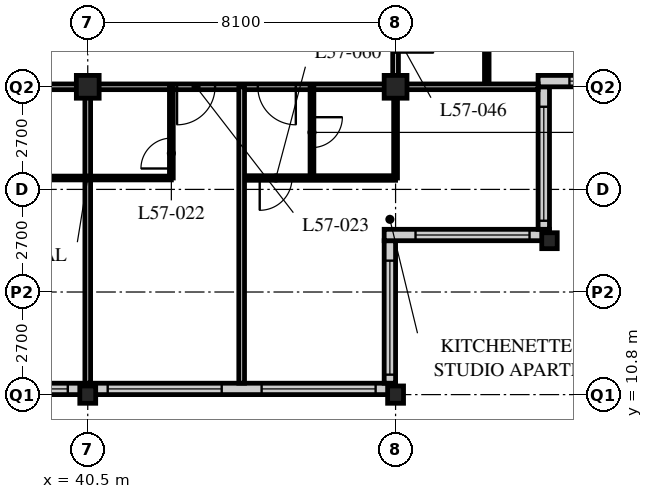
"""IFC4 building model, lengths in metres.
Left out: names, types, materials, properties, quantities, classifications, styles, units other than length and angle.
Written with IfcOpenShell. Run it as: python <this file> out.ifc"""

import sys

from ifc_helpers import new_model, si_unit, direction, frame, frame_2d, origin, origin_2d, place, context, subcontext, project, spatial, rectangle, hollow_rectangle, i_section, extrude, element, fill, save


model = new_model("IFC4")
c1 = context("Model", 3, precision=1e-05, world=origin(), true_north=direction((0.0, 1.0)))
c2 = subcontext(c1, "Body", "Model", "MODEL_VIEW")
j1 = project(units=[si_unit("LENGTHUNIT", "METRE"), si_unit("PLANEANGLEUNIT", "RADIAN")], contexts=[c1])
p1 = place(None, origin())
s1 = spatial("IfcSite", under=j1, at=p1, CompositionType="ELEMENT")
p2 = place(p1, origin())
s2 = spatial("IfcBuilding", under=s1, at=p2, CompositionType="ELEMENT")
p3 = place(p2, frame((0.0, 0.0, 220.8)))
s3 = spatial("IfcBuildingStorey", under=s2, at=p3, CompositionType="ELEMENT", Elevation=220.8)
p4 = place(p3, frame((40.5, 10.8, 0.0), z_axis=(0.0, 0.0, 1.0), x_axis=(1.0, 0.0, 0.0)))
e1 = element("IfcColumn", 1, at=p4, inside=s3, PredefinedType="COLUMN", context=c2, shape_type="SweptSolid", body=[
    extrude(i_section(OverallWidth=0.418, OverallDepth=0.456, WebThickness=0.042, FlangeThickness=0.067, FilletRadius=0.015, at=origin_2d()), origin(), (0.0, 0.0, 1.0), 3.6),
])
p5 = place(p3, frame((40.5, 18.9, 0.0), z_axis=(0.0, 0.0, 1.0), x_axis=(1.0, 0.0, 0.0)))
e2 = element("IfcColumn", 2, at=p5, inside=s3, PredefinedType="COLUMN", context=c2, shape_type="SweptSolid", body=[
    extrude(hollow_rectangle(XDim=0.6, YDim=0.6, WallThickness=0.05, at=origin_2d()), origin(), (0.0, 0.0, 1.0), 3.6),
])
p6 = place(p3, frame((48.6, 10.8, 0.0), z_axis=(0.0, 0.0, 1.0), x_axis=(1.0, 0.0, 0.0)))
e3 = element("IfcColumn", 3, at=p6, inside=s3, PredefinedType="COLUMN", context=c2, shape_type="SweptSolid", body=[
    extrude(i_section(OverallWidth=0.418, OverallDepth=0.456, WebThickness=0.042, FlangeThickness=0.067, FilletRadius=0.015, at=origin_2d()), origin(), (0.0, 0.0, 1.0), 3.6),
])
p7 = place(p3, frame((48.6, 18.9, 0.0), z_axis=(0.0, 0.0, 1.0), x_axis=(1.0, 0.0, 0.0)))
e4 = element("IfcColumn", 4, at=p7, inside=s3, PredefinedType="COLUMN", context=c2, shape_type="SweptSolid", body=[
    extrude(hollow_rectangle(XDim=0.6, YDim=0.6, WallThickness=0.05, at=origin_2d()), origin(), (0.0, 0.0, 1.0), 3.6),
])
p8 = place(p3, frame((52.65, 14.85, 0.0), z_axis=(0.0, 0.0, 1.0), x_axis=(1.0, 0.0, 0.0)))
e5 = element("IfcColumn", 5, at=p8, inside=s3, PredefinedType="COLUMN", context=c2, shape_type="SweptSolid", body=[
    extrude(i_section(OverallWidth=0.407, OverallDepth=0.419, WebThickness=0.031, FlangeThickness=0.049, FilletRadius=0.015, at=origin_2d()), origin(), (0.0, 0.0, 1.0), 3.6),
])
p9 = place(p3, frame((8.4, 10.95, 0.0), z_axis=(0.0, 0.0, 1.0), x_axis=(1.0, 0.0, 0.0)))
e6 = element("IfcWall", 6, at=p9, inside=s3, PredefinedType="SOLIDWALL", context=c2, shape_type="SweptSolid", body=[
    extrude(rectangle(XDim=40.2, YDim=0.3, at=frame_2d((20.1, 0.0))), origin(), (0.0, 0.0, 1.0), 3.39),
])
p10 = place(p9, frame((0.225, 0.0, 0.6)))
e7 = element("IfcOpeningElement", 7, at=p10, cuts=e6, PredefinedType="OPENING", context=c2, shape_type="SweptSolid", body=[
    extrude(rectangle(XDim=3.0, YDim=2.0, at=frame_2d((1.5, 1.0))), frame((0.0, 0.16, 0.0), z_axis=(0.0, -1.0, 0.0), x_axis=(1.0, 0.0, 0.0)), (0.0, 0.0, 1.0), 0.32),
])
p11 = place(p9, frame((4.275, 0.0, 0.6)))
e8 = element("IfcOpeningElement", 8, at=p11, cuts=e6, PredefinedType="OPENING", context=c2, shape_type="SweptSolid", body=[
    extrude(rectangle(XDim=3.0, YDim=2.0, at=frame_2d((1.5, 1.0))), frame((0.0, 0.16, 0.0), z_axis=(0.0, -1.0, 0.0), x_axis=(1.0, 0.0, 0.0)), (0.0, 0.0, 1.0), 0.32),
])
p12 = place(p9, frame((8.325, 0.0, 0.6)))
e9 = element("IfcOpeningElement", 9, at=p12, cuts=e6, PredefinedType="OPENING", context=c2, shape_type="SweptSolid", body=[
    extrude(rectangle(XDim=3.0, YDim=2.0, at=frame_2d((1.5, 1.0))), frame((0.0, 0.16, 0.0), z_axis=(0.0, -1.0, 0.0), x_axis=(1.0, 0.0, 0.0)), (0.0, 0.0, 1.0), 0.32),
])
p13 = place(p9, frame((12.375, 0.0, 0.6)))
e10 = element("IfcOpeningElement", 10, at=p13, cuts=e6, PredefinedType="OPENING", context=c2, shape_type="SweptSolid", body=[
    extrude(rectangle(XDim=3.0, YDim=2.0, at=frame_2d((1.5, 1.0))), frame((0.0, 0.16, 0.0), z_axis=(0.0, -1.0, 0.0), x_axis=(1.0, 0.0, 0.0)), (0.0, 0.0, 1.0), 0.32),
])
p14 = place(p9, frame((16.425, 0.0, 0.6)))
e11 = element("IfcOpeningElement", 11, at=p14, cuts=e6, PredefinedType="OPENING", context=c2, shape_type="SweptSolid", body=[
    extrude(rectangle(XDim=3.0, YDim=2.0, at=frame_2d((1.5, 1.0))), frame((0.0, 0.16, 0.0), z_axis=(0.0, -1.0, 0.0), x_axis=(1.0, 0.0, 0.0)), (0.0, 0.0, 1.0), 0.32),
])
p15 = place(p9, frame((20.475, 0.0, 0.6)))
e12 = element("IfcOpeningElement", 12, at=p15, cuts=e6, PredefinedType="OPENING", context=c2, shape_type="SweptSolid", body=[
    extrude(rectangle(XDim=3.0, YDim=2.0, at=frame_2d((1.5, 1.0))), frame((0.0, 0.16, 0.0), z_axis=(0.0, -1.0, 0.0), x_axis=(1.0, 0.0, 0.0)), (0.0, 0.0, 1.0), 0.32),
])
p16 = place(p9, frame((24.525, 0.0, 0.6)))
e13 = element("IfcOpeningElement", 13, at=p16, cuts=e6, PredefinedType="OPENING", context=c2, shape_type="SweptSolid", body=[
    extrude(rectangle(XDim=3.0, YDim=2.0, at=frame_2d((1.5, 1.0))), frame((0.0, 0.16, 0.0), z_axis=(0.0, -1.0, 0.0), x_axis=(1.0, 0.0, 0.0)), (0.0, 0.0, 1.0), 0.32),
])
p17 = place(p9, frame((28.575, 0.0, 0.6)))
e14 = element("IfcOpeningElement", 14, at=p17, cuts=e6, PredefinedType="OPENING", context=c2, shape_type="SweptSolid", body=[
    extrude(rectangle(XDim=3.0, YDim=2.0, at=frame_2d((1.5, 1.0))), frame((0.0, 0.16, 0.0), z_axis=(0.0, -1.0, 0.0), x_axis=(1.0, 0.0, 0.0)), (0.0, 0.0, 1.0), 0.32),
])
p18 = place(p9, frame((32.625, 0.0, 0.6)))
e15 = element("IfcOpeningElement", 15, at=p18, cuts=e6, PredefinedType="OPENING", context=c2, shape_type="SweptSolid", body=[
    extrude(rectangle(XDim=3.0, YDim=2.0, at=frame_2d((1.5, 1.0))), frame((0.0, 0.16, 0.0), z_axis=(0.0, -1.0, 0.0), x_axis=(1.0, 0.0, 0.0)), (0.0, 0.0, 1.0), 0.32),
])
p19 = place(p9, frame((36.675, 0.0, 0.6)))
e16 = element("IfcOpeningElement", 16, at=p19, cuts=e6, PredefinedType="OPENING", context=c2, shape_type="SweptSolid", body=[
    extrude(rectangle(XDim=3.0, YDim=2.0, at=frame_2d((1.5, 1.0))), frame((0.0, 0.16, 0.0), z_axis=(0.0, -1.0, 0.0), x_axis=(1.0, 0.0, 0.0)), (0.0, 0.0, 1.0), 0.32),
])
p20 = place(p3, frame((48.45, 11.1, 0.0), z_axis=(0.0, 0.0, 1.0), x_axis=(0.0, 1.0, 0.0)))
e17 = element("IfcWall", 17, at=p20, inside=s3, PredefinedType="SOLIDWALL", context=c2, shape_type="SweptSolid", body=[
    extrude(rectangle(XDim=3.75, YDim=0.3, at=frame_2d((1.875, 0.0))), origin(), (0.0, 0.0, 1.0), 3.39),
])
p21 = place(p20, frame((0.225, 0.0, 0.6)))
e18 = element("IfcOpeningElement", 18, at=p21, cuts=e17, PredefinedType="OPENING", context=c2, shape_type="SweptSolid", body=[
    extrude(rectangle(XDim=3.0, YDim=2.0, at=frame_2d((1.5, 1.0))), frame((0.0, 0.16, 0.0), z_axis=(0.0, -1.0, 0.0), x_axis=(1.0, 0.0, 0.0)), (0.0, 0.0, 1.0), 0.32),
])
p22 = place(p3, frame((48.3, 15.0, 0.0), z_axis=(0.0, 0.0, 1.0), x_axis=(1.0, 0.0, 0.0)))
e19 = element("IfcWall", 19, at=p22, inside=s3, PredefinedType="SOLIDWALL", context=c2, shape_type="SweptSolid", body=[
    extrude(rectangle(XDim=4.35, YDim=0.3, at=frame_2d((2.175, 0.0))), origin(), (0.0, 0.0, 1.0), 3.39),
])
p23 = place(p22, frame((0.825, 0.0, 0.6)))
e20 = element("IfcOpeningElement", 20, at=p23, cuts=e19, PredefinedType="OPENING", context=c2, shape_type="SweptSolid", body=[
    extrude(rectangle(XDim=3.0, YDim=2.0, at=frame_2d((1.5, 1.0))), frame((0.0, 0.16, 0.0), z_axis=(0.0, -1.0, 0.0), x_axis=(1.0, 0.0, 0.0)), (0.0, 0.0, 1.0), 0.32),
])
p24 = place(p3, frame((52.5, 15.15, 0.0), z_axis=(0.0, 0.0, 1.0), x_axis=(0.0, 1.0, 0.0)))
e21 = element("IfcWall", 21, at=p24, inside=s3, PredefinedType="SOLIDWALL", context=c2, shape_type="SweptSolid", body=[
    extrude(rectangle(XDim=3.75, YDim=0.3, at=frame_2d((1.875, 0.0))), origin(), (0.0, 0.0, 1.0), 3.39),
])
p25 = place(p24, frame((0.225, 0.0, 0.6)))
e22 = element("IfcOpeningElement", 22, at=p25, cuts=e21, PredefinedType="OPENING", context=c2, shape_type="SweptSolid", body=[
    extrude(rectangle(XDim=3.0, YDim=2.0, at=frame_2d((1.5, 1.0))), frame((0.0, 0.16, 0.0), z_axis=(0.0, -1.0, 0.0), x_axis=(1.0, 0.0, 0.0)), (0.0, 0.0, 1.0), 0.32),
])
p26 = place(p3, frame((52.35, 19.05, 0.0), z_axis=(0.0, 0.0, 1.0), x_axis=(1.0, 0.0, 0.0)))
e23 = element("IfcWall", 23, at=p26, inside=s3, PredefinedType="SOLIDWALL", context=c2, shape_type="SweptSolid", body=[
    extrude(rectangle(XDim=4.35, YDim=0.3, at=frame_2d((2.175, 0.0))), origin(), (0.0, 0.0, 1.0), 3.39),
])
p27 = place(p26, frame((0.825, 0.0, 0.6)))
e24 = element("IfcOpeningElement", 24, at=p27, cuts=e23, PredefinedType="OPENING", context=c2, shape_type="SweptSolid", body=[
    extrude(rectangle(XDim=3.0, YDim=2.0, at=frame_2d((1.5, 1.0))), frame((0.0, 0.16, 0.0), z_axis=(0.0, -1.0, 0.0), x_axis=(1.0, 0.0, 0.0)), (0.0, 0.0, 1.0), 0.32),
])
p28 = place(p3, frame((12.15, 18.9, 0.0), z_axis=(0.0, 0.0, 1.0), x_axis=(1.0, 0.0, 0.0)))
e25 = element("IfcWall", 25, at=p28, inside=s3, PredefinedType="PARTITIONING", context=c2, shape_type="SweptSolid", body=[
    extrude(rectangle(XDim=36.45, YDim=0.15, at=frame_2d((18.225, 0.0))), origin(), (0.0, 0.0, 1.0), 2.628),
])
p29 = place(p28, frame((4.95, 0.0, 0.0)))
e26 = element("IfcOpeningElement", 26, at=p29, cuts=e25, PredefinedType="OPENING", context=c2, shape_type="SweptSolid", body=[
    extrude(rectangle(XDim=1.0, YDim=2.1, at=frame_2d((0.5, 1.05))), frame((0.0, 0.085, 0.0), z_axis=(0.0, -1.0, 0.0), x_axis=(1.0, 0.0, 0.0)), (0.0, 0.0, 1.0), 0.17),
])
p30 = place(p28, frame((22.6, 0.0, 0.0)))
e27 = element("IfcOpeningElement", 27, at=p30, cuts=e25, PredefinedType="OPENING", context=c2, shape_type="SweptSolid", body=[
    extrude(rectangle(XDim=1.0, YDim=2.1, at=frame_2d((0.5, 1.05))), frame((0.0, 0.085, 0.0), z_axis=(0.0, -1.0, 0.0), x_axis=(1.0, 0.0, 0.0)), (0.0, 0.0, 1.0), 0.17),
])
p31 = place(p28, frame((25.0, 0.0, 0.0)))
e28 = element("IfcOpeningElement", 28, at=p31, cuts=e25, PredefinedType="OPENING", context=c2, shape_type="SweptSolid", body=[
    extrude(rectangle(XDim=1.0, YDim=2.1, at=frame_2d((0.5, 1.05))), frame((0.0, 0.085, 0.0), z_axis=(0.0, -1.0, 0.0), x_axis=(1.0, 0.0, 0.0)), (0.0, 0.0, 1.0), 0.17),
])
p32 = place(p28, frame((30.7, 0.0, 0.0)))
e29 = element("IfcOpeningElement", 29, at=p32, cuts=e25, PredefinedType="OPENING", context=c2, shape_type="SweptSolid", body=[
    extrude(rectangle(XDim=1.0, YDim=2.1, at=frame_2d((0.5, 1.05))), frame((0.0, 0.085, 0.0), z_axis=(0.0, -1.0, 0.0), x_axis=(1.0, 0.0, 0.0)), (0.0, 0.0, 1.0), 0.17),
])
p33 = place(p28, frame((1.525, 0.0, 0.0)))
e30 = element("IfcOpeningElement", 30, at=p33, cuts=e25, PredefinedType="OPENING", context=c2, shape_type="SweptSolid", body=[
    extrude(rectangle(XDim=1.0, YDim=2.1, at=frame_2d((0.5, 1.05))), frame((0.0, 0.085, 0.0), z_axis=(0.0, -1.0, 0.0), x_axis=(1.0, 0.0, 0.0)), (0.0, 0.0, 1.0), 0.17),
])
p34 = place(p28, frame((32.825, 0.0, 0.0)))
e31 = element("IfcOpeningElement", 31, at=p34, cuts=e25, PredefinedType="OPENING", context=c2, shape_type="SweptSolid", body=[
    extrude(rectangle(XDim=1.0, YDim=2.1, at=frame_2d((0.5, 1.05))), frame((0.0, 0.085, 0.0), z_axis=(0.0, -1.0, 0.0), x_axis=(1.0, 0.0, 0.0)), (0.0, 0.0, 1.0), 0.17),
])
p35 = place(p3, frame((48.6, 18.9, 0.0), z_axis=(0.0, 0.0, 1.0), x_axis=(0.0, 1.0, 0.0)))
e32 = element("IfcWall", 32, at=p35, inside=s3, PredefinedType="PARTITIONING", context=c2, shape_type="SweptSolid", body=[
    extrude(rectangle(XDim=24.3, YDim=0.15, at=frame_2d((12.15, 0.0))), origin(), (0.0, 0.0, 1.0), 2.628),
])
p36 = place(p35, frame((0.9, 0.0, 0.0)))
e33 = element("IfcOpeningElement", 33, at=p36, cuts=e32, PredefinedType="OPENING", context=c2, shape_type="SweptSolid", body=[
    extrude(rectangle(XDim=1.0, YDim=2.1, at=frame_2d((0.5, 1.05))), frame((0.0, 0.085, 0.0), z_axis=(0.0, -1.0, 0.0), x_axis=(1.0, 0.0, 0.0)), (0.0, 0.0, 1.0), 0.17),
])
p37 = place(p35, frame((20.95, 0.0, 0.0)))
e34 = element("IfcOpeningElement", 34, at=p37, cuts=e32, PredefinedType="OPENING", context=c2, shape_type="SweptSolid", body=[
    extrude(rectangle(XDim=1.0, YDim=2.1, at=frame_2d((0.5, 1.05))), frame((0.0, 0.085, 0.0), z_axis=(0.0, -1.0, 0.0), x_axis=(1.0, 0.0, 0.0)), (0.0, 0.0, 1.0), 0.17),
])
p38 = place(p3, frame((38.3, 16.5, 0.0), z_axis=(0.0, 0.0, 1.0), x_axis=(1.0, 0.0, 0.0)))
e35 = element("IfcWall", 35, at=p38, inside=s3, PredefinedType="PARTITIONING", context=c2, shape_type="SweptSolid", body=[
    extrude(rectangle(XDim=4.4, YDim=0.1, at=frame_2d((2.2, 0.0))), origin(), (0.0, 0.0, 1.0), 3.39),
])
p39 = place(p3, frame((40.5, 18.9, 0.0), z_axis=(0.0, 0.0, 1.0), x_axis=(0.0, -1.0, 0.0)))
e36 = element("IfcWall", 36, at=p39, inside=s3, PredefinedType="PARTITIONING", context=c2, shape_type="SweptSolid", body=[
    extrude(rectangle(XDim=7.8, YDim=0.15, at=frame_2d((3.9, 0.0))), origin(), (0.0, 0.0, 1.0), 2.628),
])
p40 = place(p3, frame((42.7, 18.9, 0.0), z_axis=(0.0, 0.0, 1.0), x_axis=(0.0, -1.0, 0.0)))
e37 = element("IfcWall", 37, at=p40, inside=s3, PredefinedType="PARTITIONING", context=c2, shape_type="SweptSolid", body=[
    extrude(rectangle(XDim=2.4, YDim=0.1, at=frame_2d((1.2, 0.0))), origin(), (0.0, 0.0, 1.0), 3.39),
])
p41 = place(p40, frame((1.35, 0.0, 0.0)))
e38 = element("IfcOpeningElement", 38, at=p41, cuts=e37, PredefinedType="OPENING", context=c2, shape_type="SweptSolid", body=[
    extrude(rectangle(XDim=0.8, YDim=2.1, at=frame_2d((0.4, 1.05))), frame((0.0, 0.06, 0.0), z_axis=(0.0, -1.0, 0.0), x_axis=(1.0, 0.0, 0.0)), (0.0, 0.0, 1.0), 0.12),
])
p42 = place(p3, frame((51.0, 18.9, 0.0), z_axis=(0.0, 0.0, 1.0), x_axis=(0.0, 1.0, 0.0)))
e39 = element("IfcWall", 39, at=p42, inside=s3, PredefinedType="PARTITIONING", context=c2, shape_type="SweptSolid", body=[
    extrude(rectangle(XDim=20.25, YDim=0.12, at=frame_2d((10.125, 0.0))), origin(), (0.0, 0.0, 1.0), 3.39),
])
p43 = place(p42, frame((0.975, 0.0, 0.0)))
e40 = element("IfcOpeningElement", 40, at=p43, cuts=e39, PredefinedType="OPENING", context=c2, shape_type="SweptSolid", body=[
    extrude(rectangle(XDim=0.85, YDim=2.1, at=frame_2d((0.425, 1.05))), frame((0.0, 0.07, 0.0), z_axis=(0.0, -1.0, 0.0), x_axis=(1.0, 0.0, 0.0)), (0.0, 0.0, 1.0), 0.14),
])
p44 = place(p42, frame((8.425, 0.0, 0.0)))
e41 = element("IfcOpeningElement", 41, at=p44, cuts=e39, PredefinedType="OPENING", context=c2, shape_type="SweptSolid", body=[
    extrude(rectangle(XDim=0.85, YDim=2.1, at=frame_2d((0.425, 1.05))), frame((0.0, 0.07, 0.0), z_axis=(0.0, -1.0, 0.0), x_axis=(1.0, 0.0, 0.0)), (0.0, 0.0, 1.0), 0.14),
])
p45 = place(p42, frame((12.475, 0.0, 0.0)))
e42 = element("IfcOpeningElement", 42, at=p45, cuts=e39, PredefinedType="OPENING", context=c2, shape_type="SweptSolid", body=[
    extrude(rectangle(XDim=0.85, YDim=2.1, at=frame_2d((0.425, 1.05))), frame((0.0, 0.07, 0.0), z_axis=(0.0, -1.0, 0.0), x_axis=(1.0, 0.0, 0.0)), (0.0, 0.0, 1.0), 0.14),
])
p46 = place(p42, frame((16.525, 0.0, 0.0)))
e43 = element("IfcOpeningElement", 43, at=p46, cuts=e39, PredefinedType="OPENING", context=c2, shape_type="SweptSolid", body=[
    extrude(rectangle(XDim=0.85, YDim=2.1, at=frame_2d((0.425, 1.05))), frame((0.0, 0.07, 0.0), z_axis=(0.0, -1.0, 0.0), x_axis=(1.0, 0.0, 0.0)), (0.0, 0.0, 1.0), 0.14),
])
p47 = place(p3, frame((44.55, 16.5, 0.0), z_axis=(0.0, 0.0, 1.0), x_axis=(1.0, 0.0, 0.0)))
e44 = element("IfcWall", 44, at=p47, inside=s3, PredefinedType="PARTITIONING", context=c2, shape_type="SweptSolid", body=[
    extrude(rectangle(XDim=4.05, YDim=0.12, at=frame_2d((2.025, 0.0))), origin(), (0.0, 0.0, 1.0), 3.39),
])
p48 = place(p47, frame((0.475, 0.0, 0.0)))
e45 = element("IfcOpeningElement", 45, at=p48, cuts=e44, PredefinedType="OPENING", context=c2, shape_type="SweptSolid", body=[
    extrude(rectangle(XDim=0.85, YDim=2.1, at=frame_2d((0.425, 1.05))), frame((0.0, 0.07, 0.0), z_axis=(0.0, -1.0, 0.0), x_axis=(1.0, 0.0, 0.0)), (0.0, 0.0, 1.0), 0.14),
])
p49 = place(p3, frame((46.4, 18.9, 0.0), z_axis=(0.0, 0.0, 1.0), x_axis=(0.0, -1.0, 0.0)))
e46 = element("IfcWall", 46, at=p49, inside=s3, PredefinedType="PARTITIONING", context=c2, shape_type="SweptSolid", body=[
    extrude(rectangle(XDim=2.4, YDim=0.1, at=frame_2d((1.2, 0.0))), origin(), (0.0, 0.0, 1.0), 3.39),
])
p50 = place(p49, frame((0.8, 0.0, 0.0)))
e47 = element("IfcOpeningElement", 47, at=p50, cuts=e46, PredefinedType="OPENING", context=c2, shape_type="SweptSolid", body=[
    extrude(rectangle(XDim=0.8, YDim=2.1, at=frame_2d((0.4, 1.05))), frame((0.0, 0.06, 0.0), z_axis=(0.0, -1.0, 0.0), x_axis=(1.0, 0.0, 0.0)), (0.0, 0.0, 1.0), 0.12),
])
p51 = place(p3, frame((48.6, 18.9, 0.0), z_axis=(0.0, 0.0, 1.0), x_axis=(0.0, -1.0, 0.0)))
e48 = element("IfcWall", 48, at=p51, inside=s3, PredefinedType="PARTITIONING", context=c2, shape_type="SweptSolid", body=[
    extrude(rectangle(XDim=2.4, YDim=0.1, at=frame_2d((1.2, 0.0))), origin(), (0.0, 0.0, 1.0), 2.628),
])
p52 = place(p3, frame((48.6, 18.9, 0.0), z_axis=(0.0, 0.0, 1.0), x_axis=(1.0, 0.0, 0.0)))
e49 = element("IfcWall", 49, at=p52, inside=s3, PredefinedType="PARTITIONING", context=c2, shape_type="SweptSolid", body=[
    extrude(rectangle(XDim=3.75, YDim=0.15, at=frame_2d((1.875, 0.0))), origin(), (0.0, 0.0, 1.0), 2.628),
])
p53 = place(p3, frame((44.55, 18.9, 0.0), z_axis=(0.0, 0.0, 1.0), x_axis=(0.0, -1.0, 0.0)))
e50 = element("IfcWall", 50, at=p53, inside=s3, PredefinedType="PARTITIONING", context=c2, shape_type="SweptSolid", body=[
    extrude(rectangle(XDim=7.8, YDim=0.15, at=frame_2d((3.9, 0.0))), origin(), (0.0, 0.0, 1.0), 3.39),
])
p54 = place(p17, origin())
e51 = element("IfcWindow", 51, at=p54, inside=s3, PartitioningType="SINGLE_PANEL", PredefinedType="WINDOW", context=c2, shape_type="SweptSolid", body=[
    extrude(rectangle(XDim=3.0, YDim=2.0, at=frame_2d((1.5, 1.0))), frame((0.0, 0.03, 0.0), z_axis=(0.0, -1.0, 0.0), x_axis=(1.0, 0.0, 0.0)), (0.0, 0.0, 1.0), 0.06),
])
fill(e14, e51)
p55 = place(p18, origin())
e52 = element("IfcWindow", 52, at=p55, inside=s3, PartitioningType="SINGLE_PANEL", PredefinedType="WINDOW", context=c2, shape_type="SweptSolid", body=[
    extrude(rectangle(XDim=3.0, YDim=2.0, at=frame_2d((1.5, 1.0))), frame((0.0, 0.03, 0.0), z_axis=(0.0, -1.0, 0.0), x_axis=(1.0, 0.0, 0.0)), (0.0, 0.0, 1.0), 0.06),
])
fill(e15, e52)
p56 = place(p19, origin())
e53 = element("IfcWindow", 53, at=p56, inside=s3, PartitioningType="SINGLE_PANEL", PredefinedType="WINDOW", context=c2, shape_type="SweptSolid", body=[
    extrude(rectangle(XDim=3.0, YDim=2.0, at=frame_2d((1.5, 1.0))), frame((0.0, 0.03, 0.0), z_axis=(0.0, -1.0, 0.0), x_axis=(1.0, 0.0, 0.0)), (0.0, 0.0, 1.0), 0.06),
])
fill(e16, e53)
p57 = place(p21, origin())
e54 = element("IfcWindow", 54, at=p57, inside=s3, PartitioningType="SINGLE_PANEL", PredefinedType="WINDOW", context=c2, shape_type="SweptSolid", body=[
    extrude(rectangle(XDim=3.0, YDim=2.0, at=frame_2d((1.5, 1.0))), frame((0.0, 0.03, 0.0), z_axis=(0.0, -1.0, 0.0), x_axis=(1.0, 0.0, 0.0)), (0.0, 0.0, 1.0), 0.06),
])
fill(e18, e54)
p58 = place(p23, origin())
e55 = element("IfcWindow", 55, at=p58, inside=s3, PartitioningType="SINGLE_PANEL", PredefinedType="WINDOW", context=c2, shape_type="SweptSolid", body=[
    extrude(rectangle(XDim=3.0, YDim=2.0, at=frame_2d((1.5, 1.0))), frame((0.0, 0.03, 0.0), z_axis=(0.0, -1.0, 0.0), x_axis=(1.0, 0.0, 0.0)), (0.0, 0.0, 1.0), 0.06),
])
fill(e20, e55)
p59 = place(p25, origin())
e56 = element("IfcWindow", 56, at=p59, inside=s3, PartitioningType="SINGLE_PANEL", PredefinedType="WINDOW", context=c2, shape_type="SweptSolid", body=[
    extrude(rectangle(XDim=3.0, YDim=2.0, at=frame_2d((1.5, 1.0))), frame((0.0, 0.03, 0.0), z_axis=(0.0, -1.0, 0.0), x_axis=(1.0, 0.0, 0.0)), (0.0, 0.0, 1.0), 0.06),
])
fill(e22, e56)
p60 = place(p27, origin())
e57 = element("IfcWindow", 57, at=p60, inside=s3, PartitioningType="SINGLE_PANEL", PredefinedType="WINDOW", context=c2, shape_type="SweptSolid", body=[
    extrude(rectangle(XDim=3.0, YDim=2.0, at=frame_2d((1.5, 1.0))), frame((0.0, 0.03, 0.0), z_axis=(0.0, -1.0, 0.0), x_axis=(1.0, 0.0, 0.0)), (0.0, 0.0, 1.0), 0.06),
])
fill(e24, e57)
p61 = place(p41, origin())
e58 = element("IfcDoor", 58, at=p61, inside=s3, OperationType="SINGLE_SWING_LEFT", PredefinedType="DOOR", context=c2, shape_type="SweptSolid", body=[
    extrude(rectangle(XDim=0.8, YDim=2.1, at=frame_2d((0.4, 1.05))), frame((0.0, 0.025, 0.0), z_axis=(0.0, -1.0, 0.0), x_axis=(1.0, 0.0, 0.0)), (0.0, 0.0, 1.0), 0.05),
])
fill(e38, e58)
p62 = place(p32, origin())
e59 = element("IfcDoor", 59, at=p62, inside=s3, OperationType="SINGLE_SWING_RIGHT", PredefinedType="DOOR", context=c2, shape_type="SweptSolid", body=[
    extrude(rectangle(XDim=1.0, YDim=2.1, at=frame_2d((0.5, 1.05))), frame((0.0, 0.025, 0.0), z_axis=(0.0, -1.0, 0.0), x_axis=(1.0, 0.0, 0.0)), (0.0, 0.0, 1.0), 0.05),
])
fill(e29, e59)
p63 = place(p36, origin())
e60 = element("IfcDoor", 60, at=p63, inside=s3, OperationType="SINGLE_SWING_RIGHT", PredefinedType="DOOR", context=c2, shape_type="SweptSolid", body=[
    extrude(rectangle(XDim=1.0, YDim=2.1, at=frame_2d((0.5, 1.05))), frame((0.0, 0.025, 0.0), z_axis=(0.0, -1.0, 0.0), x_axis=(1.0, 0.0, 0.0)), (0.0, 0.0, 1.0), 0.05),
])
fill(e33, e60)
p64 = place(p50, origin())
e61 = element("IfcDoor", 61, at=p64, inside=s3, OperationType="SINGLE_SWING_LEFT", PredefinedType="DOOR", context=c2, shape_type="SweptSolid", body=[
    extrude(rectangle(XDim=0.8, YDim=2.1, at=frame_2d((0.4, 1.05))), frame((0.0, 0.025, 0.0), z_axis=(0.0, -1.0, 0.0), x_axis=(1.0, 0.0, 0.0)), (0.0, 0.0, 1.0), 0.05),
])
fill(e47, e61)
p65 = place(p34, origin())
e62 = element("IfcDoor", 62, at=p65, inside=s3, OperationType="SINGLE_SWING_LEFT", PredefinedType="DOOR", context=c2, shape_type="SweptSolid", body=[
    extrude(rectangle(XDim=1.0, YDim=2.1, at=frame_2d((0.5, 1.05))), frame((0.0, 0.025, 0.0), z_axis=(0.0, -1.0, 0.0), x_axis=(1.0, 0.0, 0.0)), (0.0, 0.0, 1.0), 0.05),
])
fill(e31, e62)
p66 = place(p48, origin())
e63 = element("IfcDoor", 63, at=p66, inside=s3, OperationType="SINGLE_SWING_RIGHT", PredefinedType="DOOR", context=c2, shape_type="SweptSolid", body=[
    extrude(rectangle(XDim=0.85, YDim=2.1, at=frame_2d((0.425, 1.05))), frame((0.0, 0.025, 0.0), z_axis=(0.0, -1.0, 0.0), x_axis=(1.0, 0.0, 0.0)), (0.0, 0.0, 1.0), 0.05),
])
fill(e45, e63)
save(model, sys.argv[1])
